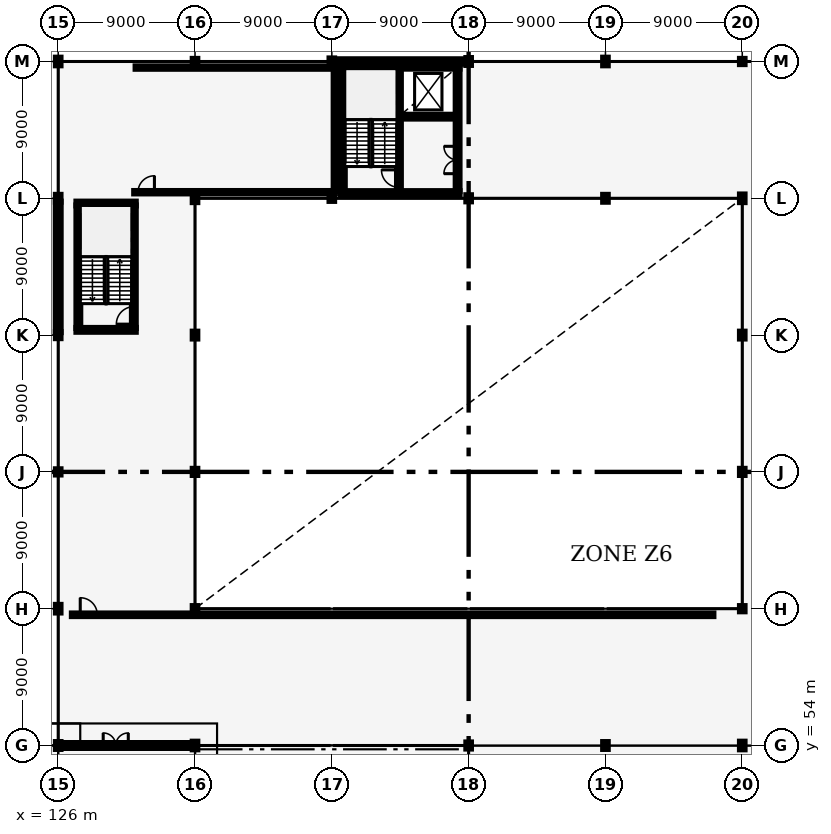
"""IFC4 building model, lengths in metres.
Left out: names, types, materials, properties, quantities, classifications, styles, units other than length and angle.
Written with IfcOpenShell. Run it as: python <this file> out.ifc"""

import sys

from ifc_helpers import new_model, si_unit, direction, frame, frame_2d, origin, origin_2d, place, context, subcontext, project, spatial, rectangle, i_section, extrude, element, fill, save


model = new_model("IFC4")
c1 = context("Model", 3, precision=1e-05, world=origin(), true_north=direction((0.0, 1.0)))
c2 = subcontext(c1, "Body", "Model", "MODEL_VIEW")
j1 = project(units=[si_unit("LENGTHUNIT", "METRE"), si_unit("PLANEANGLEUNIT", "RADIAN")], contexts=[c1])
p1 = place(None, origin())
s1 = spatial("IfcSite", under=j1, at=p1, CompositionType="ELEMENT")
p2 = place(p1, origin())
s2 = spatial("IfcBuilding", under=s1, at=p2, CompositionType="ELEMENT")
p3 = place(p2, frame((0.0, 0.0, 22.8)))
s3 = spatial("IfcBuildingStorey", under=s2, at=p3, CompositionType="ELEMENT", Elevation=22.8)
p4 = place(p3, frame((126.0, 54.0, 0.0), z_axis=(0.0, 0.0, 1.0), x_axis=(1.0, 0.0, 0.0)))
e1 = element("IfcColumn", 1, at=p4, inside=s3, PredefinedType="COLUMN", context=c2, shape_type="SweptSolid", body=[
    extrude(i_section(OverallWidth=0.3, OverallDepth=0.45, WebThickness=0.014, FlangeThickness=0.026, FilletRadius=0.027, at=origin_2d()), origin(), (0.0, 0.0, 1.0), 4.0),
])
p5 = place(p3, frame((126.0, 63.0, 0.0), z_axis=(0.0, 0.0, 1.0), x_axis=(1.0, 0.0, 0.0)))
e2 = element("IfcColumn", 2, at=p5, inside=s3, PredefinedType="COLUMN", context=c2, shape_type="SweptSolid", body=[
    extrude(i_section(OverallWidth=0.3, OverallDepth=0.5, WebThickness=0.014, FlangeThickness=0.028, FilletRadius=0.027, at=origin_2d()), origin(), (0.0, 0.0, 1.0), 4.0),
])
p6 = place(p3, frame((126.0, 72.0, 0.0), z_axis=(0.0, 0.0, 1.0), x_axis=(1.0, 0.0, 0.0)))
e3 = element("IfcColumn", 3, at=p6, inside=s3, PredefinedType="COLUMN", context=c2, shape_type="SweptSolid", body=[
    extrude(i_section(OverallWidth=0.3, OverallDepth=0.34, WebThickness=0.012, FlangeThickness=0.021, FilletRadius=0.027, at=origin_2d()), origin(), (0.0, 0.0, 1.0), 4.0),
])
p7 = place(p3, frame((126.0, 81.0, 0.0), z_axis=(0.0, 0.0, 1.0), x_axis=(1.0, 0.0, 0.0)))
e4 = element("IfcColumn", 4, at=p7, inside=s3, PredefinedType="COLUMN", context=c2, shape_type="SweptSolid", body=[
    extrude(i_section(OverallWidth=0.3, OverallDepth=0.4, WebThickness=0.013, FlangeThickness=0.024, FilletRadius=0.027, at=origin_2d()), origin(), (0.0, 0.0, 1.0), 4.0),
])
p8 = place(p3, frame((126.0, 90.0, 0.0), z_axis=(0.0, 0.0, 1.0), x_axis=(1.0, 0.0, 0.0)))
e5 = element("IfcColumn", 5, at=p8, inside=s3, PredefinedType="COLUMN", context=c2, shape_type="SweptSolid", body=[
    extrude(i_section(OverallWidth=0.3, OverallDepth=0.45, WebThickness=0.014, FlangeThickness=0.026, FilletRadius=0.027, at=origin_2d()), origin(), (0.0, 0.0, 1.0), 4.0),
])
for number, where, z_axis, x_axis in (
    (6, (126.0, 99.0, 0.0), (0.0, 0.0, 1.0), (1.0, 0.0, 0.0)),
    (7, (135.0, 54.0, 0.0), (0.0, 0.0, 1.0), (1.0, 0.0, 0.0)),
):
    element("IfcColumn", number, at=place(p3, frame(where, z_axis=z_axis, x_axis=x_axis)), inside=s3, PredefinedType="COLUMN", context=c2, shape_type="SweptSolid", body=[
        extrude(i_section(OverallWidth=0.3, OverallDepth=0.5, WebThickness=0.014, FlangeThickness=0.028, FilletRadius=0.027, at=origin_2d()), origin(), (0.0, 0.0, 1.0), 4.0),
    ])
p9 = place(p3, frame((135.0, 63.0, 0.0), z_axis=(0.0, 0.0, 1.0), x_axis=(1.0, 0.0, 0.0)))
e8 = element("IfcColumn", 8, at=p9, inside=s3, PredefinedType="COLUMN", context=c2, shape_type="SweptSolid", body=[
    extrude(i_section(OverallWidth=0.3, OverallDepth=0.34, WebThickness=0.012, FlangeThickness=0.021, FilletRadius=0.027, at=origin_2d()), origin(), (0.0, 0.0, 1.0), 4.0),
])
p10 = place(p3, frame((135.0, 72.0, 0.0), z_axis=(0.0, 0.0, 1.0), x_axis=(1.0, 0.0, 0.0)))
e9 = element("IfcColumn", 9, at=p10, inside=s3, PredefinedType="COLUMN", context=c2, shape_type="SweptSolid", body=[
    extrude(i_section(OverallWidth=0.3, OverallDepth=0.4, WebThickness=0.013, FlangeThickness=0.024, FilletRadius=0.027, at=origin_2d()), origin(), (0.0, 0.0, 1.0), 4.0),
])
p11 = place(p3, frame((135.0, 81.0, 0.0), z_axis=(0.0, 0.0, 1.0), x_axis=(1.0, 0.0, 0.0)))
e10 = element("IfcColumn", 10, at=p11, inside=s3, PredefinedType="COLUMN", context=c2, shape_type="SweptSolid", body=[
    extrude(i_section(OverallWidth=0.3, OverallDepth=0.45, WebThickness=0.014, FlangeThickness=0.026, FilletRadius=0.027, at=origin_2d()), origin(), (0.0, 0.0, 1.0), 4.0),
])
p12 = place(p3, frame((135.0, 90.0, 0.0), z_axis=(0.0, 0.0, 1.0), x_axis=(1.0, 0.0, 0.0)))
e11 = element("IfcColumn", 11, at=p12, inside=s3, PredefinedType="COLUMN", context=c2, shape_type="SweptSolid", body=[
    extrude(i_section(OverallWidth=0.3, OverallDepth=0.5, WebThickness=0.014, FlangeThickness=0.028, FilletRadius=0.027, at=origin_2d()), origin(), (0.0, 0.0, 1.0), 4.0),
])
for number, where, z_axis, x_axis in (
    (12, (135.0, 99.0, 0.0), (0.0, 0.0, 1.0), (1.0, 0.0, 0.0)),
    (13, (144.0, 90.0, 0.0), (0.0, 0.0, 1.0), (1.0, 0.0, 0.0)),
):
    element("IfcColumn", number, at=place(p3, frame(where, z_axis=z_axis, x_axis=x_axis)), inside=s3, PredefinedType="COLUMN", context=c2, shape_type="SweptSolid", body=[
        extrude(i_section(OverallWidth=0.3, OverallDepth=0.34, WebThickness=0.012, FlangeThickness=0.021, FilletRadius=0.027, at=origin_2d()), origin(), (0.0, 0.0, 1.0), 4.0),
    ])
for number, where, z_axis, x_axis in (
    (14, (144.0, 99.0, 0.0), (0.0, 0.0, 1.0), (1.0, 0.0, 0.0)),
    (15, (153.0, 54.0, 0.0), (0.0, 0.0, 1.0), (1.0, 0.0, 0.0)),
    (16, (153.0, 90.0, 0.0), (0.0, 0.0, 1.0), (1.0, 0.0, 0.0)),
):
    element("IfcColumn", number, at=place(p3, frame(where, z_axis=z_axis, x_axis=x_axis)), inside=s3, PredefinedType="COLUMN", context=c2, shape_type="SweptSolid", body=[
        extrude(i_section(OverallWidth=0.3, OverallDepth=0.4, WebThickness=0.013, FlangeThickness=0.024, FilletRadius=0.027, at=origin_2d()), origin(), (0.0, 0.0, 1.0), 4.0),
    ])
for number, where, z_axis, x_axis in (
    (17, (153.0, 99.0, 0.0), (0.0, 0.0, 1.0), (1.0, 0.0, 0.0)),
    (18, (162.0, 54.0, 0.0), (0.0, 0.0, 1.0), (1.0, 0.0, 0.0)),
    (19, (162.0, 90.0, 0.0), (0.0, 0.0, 1.0), (1.0, 0.0, 0.0)),
):
    element("IfcColumn", number, at=place(p3, frame(where, z_axis=z_axis, x_axis=x_axis)), inside=s3, PredefinedType="COLUMN", context=c2, shape_type="SweptSolid", body=[
        extrude(i_section(OverallWidth=0.3, OverallDepth=0.45, WebThickness=0.014, FlangeThickness=0.026, FilletRadius=0.027, at=origin_2d()), origin(), (0.0, 0.0, 1.0), 4.0),
    ])
for number, where, z_axis, x_axis in (
    (20, (162.0, 99.0, 0.0), (0.0, 0.0, 1.0), (1.0, 0.0, 0.0)),
    (21, (171.0, 54.0, 0.0), (0.0, 0.0, 1.0), (1.0, 0.0, 0.0)),
):
    element("IfcColumn", number, at=place(p3, frame(where, z_axis=z_axis, x_axis=x_axis)), inside=s3, PredefinedType="COLUMN", context=c2, shape_type="SweptSolid", body=[
        extrude(i_section(OverallWidth=0.3, OverallDepth=0.5, WebThickness=0.014, FlangeThickness=0.028, FilletRadius=0.027, at=origin_2d()), origin(), (0.0, 0.0, 1.0), 4.0),
    ])
p13 = place(p3, frame((171.0, 63.0, 0.0), z_axis=(0.0, 0.0, 1.0), x_axis=(1.0, 0.0, 0.0)))
e22 = element("IfcColumn", 22, at=p13, inside=s3, PredefinedType="COLUMN", context=c2, shape_type="SweptSolid", body=[
    extrude(i_section(OverallWidth=0.3, OverallDepth=0.34, WebThickness=0.012, FlangeThickness=0.021, FilletRadius=0.027, at=origin_2d()), origin(), (0.0, 0.0, 1.0), 4.0),
])
p14 = place(p3, frame((171.0, 72.0, 0.0), z_axis=(0.0, 0.0, 1.0), x_axis=(1.0, 0.0, 0.0)))
e23 = element("IfcColumn", 23, at=p14, inside=s3, PredefinedType="COLUMN", context=c2, shape_type="SweptSolid", body=[
    extrude(i_section(OverallWidth=0.3, OverallDepth=0.4, WebThickness=0.013, FlangeThickness=0.024, FilletRadius=0.027, at=origin_2d()), origin(), (0.0, 0.0, 1.0), 4.0),
])
p15 = place(p3, frame((171.0, 81.0, 0.0), z_axis=(0.0, 0.0, 1.0), x_axis=(1.0, 0.0, 0.0)))
e24 = element("IfcColumn", 24, at=p15, inside=s3, PredefinedType="COLUMN", context=c2, shape_type="SweptSolid", body=[
    extrude(i_section(OverallWidth=0.3, OverallDepth=0.45, WebThickness=0.014, FlangeThickness=0.026, FilletRadius=0.027, at=origin_2d()), origin(), (0.0, 0.0, 1.0), 4.0),
])
p16 = place(p3, frame((171.0, 90.0, 0.0), z_axis=(0.0, 0.0, 1.0), x_axis=(1.0, 0.0, 0.0)))
e25 = element("IfcColumn", 25, at=p16, inside=s3, PredefinedType="COLUMN", context=c2, shape_type="SweptSolid", body=[
    extrude(i_section(OverallWidth=0.3, OverallDepth=0.5, WebThickness=0.014, FlangeThickness=0.028, FilletRadius=0.027, at=origin_2d()), origin(), (0.0, 0.0, 1.0), 4.0),
])
p17 = place(p3, frame((171.0, 99.0, 0.0), z_axis=(0.0, 0.0, 1.0), x_axis=(1.0, 0.0, 0.0)))
e26 = element("IfcColumn", 26, at=p17, inside=s3, PredefinedType="COLUMN", context=c2, shape_type="SweptSolid", body=[
    extrude(i_section(OverallWidth=0.3, OverallDepth=0.34, WebThickness=0.012, FlangeThickness=0.021, FilletRadius=0.027, at=origin_2d()), origin(), (0.0, 0.0, 1.0), 4.0),
])
p18 = place(p3, frame((126.145, 54.0, 0.0), z_axis=(0.0, 0.0, 1.0), x_axis=(1.0, 0.0, 0.0)))
e27 = element("IfcWall", 27, at=p18, inside=s3, PredefinedType="SOLIDWALL", context=c2, shape_type="SweptSolid", body=[
    extrude(rectangle(XDim=8.71, YDim=0.32, at=frame_2d((4.355, 0.0))), origin(), (0.0, 0.0, 1.0), 2.85),
])
p19 = place(p18, frame((2.815, 0.0, 0.0)))
e28 = element("IfcOpeningElement", 28, at=p19, cuts=e27, PredefinedType="OPENING", context=c2, shape_type="SweptSolid", body=[
    extrude(rectangle(XDim=1.65, YDim=2.25, at=frame_2d((0.825, 1.125))), frame((0.0, 0.17, 0.0), z_axis=(0.0, -1.0, 0.0), x_axis=(1.0, 0.0, 0.0)), (0.0, 0.0, 1.0), 0.34),
])
p20 = place(p18, frame((5.415, 0.0, 0.85)))
e29 = element("IfcOpeningElement", 29, at=p20, cuts=e27, PredefinedType="OPENING", context=c2, shape_type="SweptSolid", body=[
    extrude(rectangle(XDim=1.95, YDim=1.5, at=frame_2d((0.975, 0.75))), frame((0.0, 0.17, 0.0), z_axis=(0.0, -1.0, 0.0), x_axis=(1.0, 0.0, 0.0)), (0.0, 0.0, 1.0), 0.34),
])
p21 = place(p3, frame((126.0, 81.195, 0.0), z_axis=(0.0, 0.0, 1.0), x_axis=(0.0, 1.0, 0.0)))
e30 = element("IfcWall", 30, at=p21, inside=s3, PredefinedType="SOLIDWALL", context=c2, shape_type="SweptSolid", body=[
    extrude(rectangle(XDim=8.585, YDim=0.32, at=frame_2d((4.292, 0.0))), origin(), (0.0, 0.0, 1.0), 2.85),
])
p22 = place(p3, frame((144.145, 99.0, 0.0), z_axis=(0.0, 0.0, 1.0), x_axis=(1.0, 0.0, 0.0)))
e31 = element("IfcWall", 31, at=p22, inside=s3, PredefinedType="SOLIDWALL", context=c2, shape_type="SweptSolid", body=[
    extrude(rectangle(XDim=8.71, YDim=0.29, at=frame_2d((4.355, 0.0))), origin(), (0.0, 0.0, 1.0), 2.85),
])
p23 = place(p3, frame((144.725, 90.47, 0.0), z_axis=(0.0, 0.0, 1.0), x_axis=(0.0, 1.0, 0.0)))
e32 = element("IfcWall", 32, at=p23, inside=s3, PredefinedType="SHEAR", context=c2, shape_type="SweptSolid", body=[
    extrude(rectangle(XDim=8.06, YDim=0.25, at=frame_2d((4.03, 0.0))), origin(), (0.0, 0.0, 1.0), 3.64),
])
p24 = place(p3, frame((152.275, 90.47, 0.0), z_axis=(0.0, 0.0, 1.0), x_axis=(0.0, 1.0, 0.0)))
e33 = element("IfcWall", 33, at=p24, inside=s3, PredefinedType="SHEAR", context=c2, shape_type="SweptSolid", body=[
    extrude(rectangle(XDim=8.06, YDim=0.25, at=frame_2d((4.03, 0.0))), origin(), (0.0, 0.0, 1.0), 3.64),
])
p25 = place(p24, frame((1.15, 0.0, 0.0)))
e34 = element("IfcOpeningElement", 34, at=p25, cuts=e33, PredefinedType="OPENING", context=c2, shape_type="SweptSolid", body=[
    extrude(rectangle(XDim=1.8, YDim=2.2, at=frame_2d((0.9, 1.1))), frame((0.0, 0.135, 0.0), z_axis=(0.0, -1.0, 0.0), x_axis=(1.0, 0.0, 0.0)), (0.0, 0.0, 1.0), 0.27),
])
for number, where, z_axis, x_axis in (
    (35, (144.6, 90.345, 0.0), (0.0, 0.0, 1.0), (1.0, 0.0, 0.0)),
    (36, (144.6, 98.655, 0.0), (0.0, 0.0, 1.0), (1.0, 0.0, 0.0)),
):
    element("IfcWall", number, at=place(p3, frame(where, z_axis=z_axis, x_axis=x_axis)), inside=s3, PredefinedType="SHEAR", context=c2, shape_type="SweptSolid", body=[
        extrude(rectangle(XDim=7.8, YDim=0.25, at=frame_2d((3.9, 0.0))), origin(), (0.0, 0.0, 1.0), 3.64),
    ])
p26 = place(p3, frame((148.415, 90.47, 0.0), z_axis=(0.0, 0.0, 1.0), x_axis=(0.0, 1.0, 0.0)))
e37 = element("IfcWall", 37, at=p26, inside=s3, PredefinedType="SHEAR", context=c2, shape_type="SweptSolid", body=[
    extrude(rectangle(XDim=8.06, YDim=0.25, at=frame_2d((4.03, 0.0))), origin(), (0.0, 0.0, 1.0), 3.64),
])
p27 = place(p26, frame((0.25, 0.0, 0.0)))
e38 = element("IfcOpeningElement", 38, at=p27, cuts=e37, PredefinedType="OPENING", context=c2, shape_type="SweptSolid", body=[
    extrude(rectangle(XDim=1.15, YDim=2.15, at=frame_2d((0.575, 1.075))), frame((0.0, 0.135, 0.0), z_axis=(0.0, -1.0, 0.0), x_axis=(1.0, 0.0, 0.0)), (0.0, 0.0, 1.0), 0.27),
])
p28 = place(p3, frame((148.54, 95.37, 0.0), z_axis=(0.0, 0.0, 1.0), x_axis=(1.0, 0.0, 0.0)))
e39 = element("IfcWall", 39, at=p28, inside=s3, PredefinedType="SHEAR", context=c2, shape_type="SweptSolid", body=[
    extrude(rectangle(XDim=3.61, YDim=0.25, at=frame_2d((1.805, 0.0))), origin(), (0.0, 0.0, 1.0), 3.64),
])
p29 = place(p28, frame((0.95, 0.0, 0.0)))
e40 = element("IfcOpeningElement", 40, at=p29, cuts=e39, PredefinedType="OPENING", context=c2, shape_type="SweptSolid", body=[
    extrude(rectangle(XDim=1.2, YDim=2.2, at=frame_2d((0.6, 1.1))), frame((0.0, 0.135, 0.0), z_axis=(0.0, -1.0, 0.0), x_axis=(1.0, 0.0, 0.0)), (0.0, 0.0, 1.0), 0.27),
])
p30 = place(p3, frame((127.325, 81.47, 0.0), z_axis=(0.0, 0.0, 1.0), x_axis=(0.0, 1.0, 0.0)))
e41 = element("IfcWall", 41, at=p30, inside=s3, PredefinedType="SHEAR", context=c2, shape_type="SweptSolid", body=[
    extrude(rectangle(XDim=8.06, YDim=0.25, at=frame_2d((4.03, 0.0))), origin(), (0.0, 0.0, 1.0), 3.64),
])
p31 = place(p3, frame((130.975, 81.47, 0.0), z_axis=(0.0, 0.0, 1.0), x_axis=(0.0, 1.0, 0.0)))
e42 = element("IfcWall", 42, at=p31, inside=s3, PredefinedType="SHEAR", context=c2, shape_type="SweptSolid", body=[
    extrude(rectangle(XDim=8.06, YDim=0.25, at=frame_2d((4.03, 0.0))), origin(), (0.0, 0.0, 1.0), 3.64),
])
p32 = place(p31, frame((0.25, 0.0, 0.0)))
e43 = element("IfcOpeningElement", 43, at=p32, cuts=e42, PredefinedType="OPENING", context=c2, shape_type="SweptSolid", body=[
    extrude(rectangle(XDim=1.15, YDim=2.15, at=frame_2d((0.575, 1.075))), frame((0.0, 0.135, 0.0), z_axis=(0.0, -1.0, 0.0), x_axis=(1.0, 0.0, 0.0)), (0.0, 0.0, 1.0), 0.27),
])
for number, where, z_axis, x_axis in (
    (44, (127.2, 81.345, 0.0), (0.0, 0.0, 1.0), (1.0, 0.0, 0.0)),
    (45, (127.2, 89.655, 0.0), (0.0, 0.0, 1.0), (1.0, 0.0, 0.0)),
):
    element("IfcWall", number, at=place(p3, frame(where, z_axis=z_axis, x_axis=x_axis)), inside=s3, PredefinedType="SHEAR", context=c2, shape_type="SweptSolid", body=[
        extrude(rectangle(XDim=3.9, YDim=0.25, at=frame_2d((1.95, 0.0))), origin(), (0.0, 0.0, 1.0), 3.64),
    ])
p33 = place(p3, frame((126.9, 62.6, 0.0), z_axis=(0.0, 0.0, 1.0), x_axis=(1.0, 0.0, 0.0)))
e46 = element("IfcWall", 46, at=p33, inside=s3, PredefinedType="PARTITIONING", context=c2, shape_type="SweptSolid", body=[
    extrude(rectangle(XDim=42.2, YDim=0.17, at=frame_2d((21.1, 0.0))), origin(), (0.0, 0.0, 1.0), 2.8),
])
p34 = place(p33, frame((0.55, 0.0, 0.0)))
e47 = element("IfcOpeningElement", 47, at=p34, cuts=e46, PredefinedType="OPENING", context=c2, shape_type="SweptSolid", body=[
    extrude(rectangle(XDim=1.12, YDim=2.2, at=frame_2d((0.56, 1.1))), frame((0.0, 0.095, 0.0), z_axis=(0.0, -1.0, 0.0), x_axis=(1.0, 0.0, 0.0)), (0.0, 0.0, 1.0), 0.19),
])
p35 = place(p3, frame((131.0, 90.4, 0.0), z_axis=(0.0, 0.0, 1.0), x_axis=(1.0, 0.0, 0.0)))
e48 = element("IfcWall", 48, at=p35, inside=s3, PredefinedType="PARTITIONING", context=c2, shape_type="SweptSolid", body=[
    extrude(rectangle(XDim=13.2, YDim=0.155, at=frame_2d((6.6, 0.0))), origin(), (0.0, 0.0, 1.0), 2.8),
])
p36 = place(p35, frame((0.25, 0.0, 0.0)))
e49 = element("IfcOpeningElement", 49, at=p36, cuts=e48, PredefinedType="OPENING", context=c2, shape_type="SweptSolid", body=[
    extrude(rectangle(XDim=1.08, YDim=2.18, at=frame_2d((0.54, 1.09))), frame((0.0, 0.087, 0.0), z_axis=(0.0, -1.0, 0.0), x_axis=(1.0, 0.0, 0.0)), (0.0, 0.0, 1.0), 0.175),
])
p37 = place(p3, frame((131.093, 98.6, 0.0), z_axis=(0.0, 0.0, 1.0), x_axis=(1.0, 0.0, 0.0)))
e50 = element("IfcWall", 50, at=p37, inside=s3, PredefinedType="PARTITIONING", context=c2, shape_type="SweptSolid", body=[
    extrude(rectangle(XDim=13.014, YDim=0.155, at=frame_2d((6.507, 0.0))), origin(), (0.0, 0.0, 1.0), 2.8),
])
p38 = place(p3, frame((144.2, 90.493, 0.0), z_axis=(0.0, 0.0, 1.0), x_axis=(0.0, 1.0, 0.0)))
e51 = element("IfcWall", 51, at=p38, inside=s3, PredefinedType="PARTITIONING", context=c2, shape_type="SweptSolid", body=[
    extrude(rectangle(XDim=8.014, YDim=0.155, at=frame_2d((4.007, 0.0))), origin(), (0.0, 0.0, 1.0), 2.8),
])
p39 = place(p19, origin())
e52 = element("IfcDoor", 52, at=p39, inside=s3, OperationType="DOUBLE_DOOR_SINGLE_SWING", PredefinedType="DOOR", context=c2, shape_type="SweptSolid", body=[
    extrude(rectangle(XDim=1.65, YDim=2.25, at=frame_2d((0.825, 1.125))), frame((0.0, 0.025, 0.0), z_axis=(0.0, -1.0, 0.0), x_axis=(1.0, 0.0, 0.0)), (0.0, 0.0, 1.0), 0.05),
])
fill(e28, e52)
p40 = place(p20, origin())
e53 = element("IfcWindow", 53, at=p40, inside=s3, PartitioningType="SINGLE_PANEL", PredefinedType="WINDOW", context=c2, shape_type="SweptSolid", body=[
    extrude(rectangle(XDim=1.95, YDim=1.5, at=frame_2d((0.975, 0.75))), frame((0.0, 0.03, 0.0), z_axis=(0.0, -1.0, 0.0), x_axis=(1.0, 0.0, 0.0)), (0.0, 0.0, 1.0), 0.06),
])
fill(e29, e53)
p41 = place(p27, origin())
e54 = element("IfcDoor", 54, at=p41, inside=s3, OperationType="SINGLE_SWING_RIGHT", PredefinedType="DOOR", context=c2, shape_type="SweptSolid", body=[
    extrude(rectangle(XDim=1.15, YDim=2.15, at=frame_2d((0.575, 1.075))), frame((0.0, 0.025, 0.0), z_axis=(0.0, -1.0, 0.0), x_axis=(1.0, 0.0, 0.0)), (0.0, 0.0, 1.0), 0.05),
])
fill(e38, e54)
p42 = place(p29, origin())
e55 = element("IfcDoor", 55, at=p42, inside=s3, OperationType="DOUBLE_DOOR_SLIDING", PredefinedType="DOOR", context=c2, shape_type="SweptSolid", body=[
    extrude(rectangle(XDim=1.2, YDim=2.2, at=frame_2d((0.6, 1.1))), frame((0.0, 0.025, 0.0), z_axis=(0.0, -1.0, 0.0), x_axis=(1.0, 0.0, 0.0)), (0.0, 0.0, 1.0), 0.05),
])
fill(e40, e55)
p43 = place(p25, origin())
e56 = element("IfcDoor", 56, at=p43, inside=s3, OperationType="DOUBLE_DOOR_SINGLE_SWING", PredefinedType="DOOR", context=c2, shape_type="SweptSolid", body=[
    extrude(rectangle(XDim=1.8, YDim=2.2, at=frame_2d((0.9, 1.1))), frame((0.0, 0.025, 0.0), z_axis=(0.0, -1.0, 0.0), x_axis=(1.0, 0.0, 0.0)), (0.0, 0.0, 1.0), 0.05),
])
fill(e34, e56)
p44 = place(p32, origin())
e57 = element("IfcDoor", 57, at=p44, inside=s3, OperationType="SINGLE_SWING_LEFT", PredefinedType="DOOR", context=c2, shape_type="SweptSolid", body=[
    extrude(rectangle(XDim=1.15, YDim=2.15, at=frame_2d((0.575, 1.075))), frame((0.0, 0.025, 0.0), z_axis=(0.0, -1.0, 0.0), x_axis=(1.0, 0.0, 0.0)), (0.0, 0.0, 1.0), 0.05),
])
fill(e43, e57)
p45 = place(p34, origin())
e58 = element("IfcDoor", 58, at=p45, inside=s3, OperationType="SINGLE_SWING_LEFT", PredefinedType="DOOR", context=c2, shape_type="SweptSolid", body=[
    extrude(rectangle(XDim=1.12, YDim=2.2, at=frame_2d((0.56, 1.1))), frame((0.0, 0.025, 0.0), z_axis=(0.0, -1.0, 0.0), x_axis=(1.0, 0.0, 0.0)), (0.0, 0.0, 1.0), 0.05),
])
fill(e47, e58)
p46 = place(p36, origin())
e59 = element("IfcDoor", 59, at=p46, inside=s3, OperationType="SINGLE_SWING_RIGHT", PredefinedType="DOOR", context=c2, shape_type="SweptSolid", body=[
    extrude(rectangle(XDim=1.08, YDim=2.18, at=frame_2d((0.54, 1.09))), frame((0.0, 0.025, 0.0), z_axis=(0.0, -1.0, 0.0), x_axis=(1.0, 0.0, 0.0)), (0.0, 0.0, 1.0), 0.05),
])
fill(e49, e59)
save(model, sys.argv[1])
